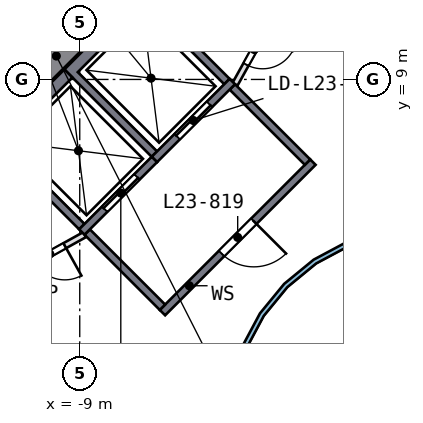
"""IFC4 building model, lengths in metres.
Left out: names, types, materials, properties, quantities, classifications, styles, units other than length and angle.
Written with IfcOpenShell. Run it as: python <this file> out.ifc"""

import sys

from ifc_helpers import new_model, si_unit, direction, frame, frame_2d, origin, place, context, subcontext, project, spatial, polyline, rectangle, outline, extrude, element, fill, save


model = new_model("IFC4")
c1 = context("Model", 3, precision=1e-05, world=origin(), true_north=direction((0.0, 1.0)))
c2 = subcontext(c1, "Body", "Model", "MODEL_VIEW")
j1 = project(units=[si_unit("LENGTHUNIT", "METRE"), si_unit("PLANEANGLEUNIT", "RADIAN")], contexts=[c1])
p1 = place(None, origin())
s1 = spatial("IfcSite", under=j1, at=p1, CompositionType="ELEMENT")
p2 = place(p1, origin())
s2 = spatial("IfcBuilding", under=s1, at=p2, CompositionType="ELEMENT")
p3 = place(p2, frame((0.0, 0.0, 100.0)))
s3 = spatial("IfcBuildingStorey", under=s2, at=p3, CompositionType="ELEMENT", Elevation=100.0)
p4 = place(p3, frame((-5.516, 13.717, 0.0), z_axis=(0.0, 0.0, 1.0), x_axis=(-0.707106781, -0.707106781, 0.0)))
e1 = element("IfcWall", 1, at=p4, inside=s3, PredefinedType="SHEAR", context=c2, shape_type="SweptSolid", body=[
    extrude(rectangle(XDim=11.598, YDim=0.8, at=frame_2d((5.799, 0.0))), origin(), (0.0, 0.0, 1.0), 3.5),
])
p5 = place(p3, origin())
e2 = element("IfcWall", 2, at=p5, inside=s3, PredefinedType="SOLIDWALL", context=c2, shape_type="SweptSolid", body=[
    extrude(outline(polyline([(-9.405, 9.263), (-7.354, 11.314), (-5.056, 9.016), (-5.197, 8.874), (-7.283, 10.96), (-9.051, 9.192), (-6.965, 7.106), (-7.106, 6.965), (-9.405, 9.263)])), origin(), (0.0, 0.0, 1.0), 3.19),
])
p6 = place(p3, frame((-4.985, 8.945, 0.0), z_axis=(0.0, 0.0, 1.0), x_axis=(-0.707106781, -0.707106781, 0.0)))
e3 = element("IfcWall", 3, at=p6, inside=s3, PredefinedType="SOLIDWALL", context=c2, shape_type="SweptSolid", body=[
    extrude(rectangle(XDim=2.9, YDim=0.2, at=frame_2d((1.45, 0.0))), origin(), (0.0, 0.0, 1.0), 3.19),
])
p7 = place(p6, frame((0.85, 0.0, 0.0)))
e4 = element("IfcOpeningElement", 4, at=p7, cuts=e3, PredefinedType="OPENING", context=c2, shape_type="SweptSolid", body=[
    extrude(rectangle(XDim=1.2, YDim=2.1, at=frame_2d((0.6, 1.05))), frame((0.0, 0.11, 0.0), z_axis=(0.0, -1.0, 0.0), x_axis=(1.0, 0.0, 0.0)), (0.0, 0.0, 1.0), 0.22),
])
p8 = place(p3, origin())
e5 = element("IfcWall", 5, at=p8, inside=s3, PredefinedType="SOLIDWALL", context=c2, shape_type="SweptSolid", body=[
    extrude(outline(polyline([(-11.314, 7.354), (-9.405, 9.263), (-9.192, 9.051), (-10.96, 7.283), (-8.874, 5.197), (-9.016, 5.056), (-11.314, 7.354)])), origin(), (0.0, 0.0, 1.0), 3.19),
])
p9 = place(p3, frame((-7.036, 6.894, 0.0), z_axis=(0.0, 0.0, 1.0), x_axis=(-0.707106781, -0.707106781, 0.0)))
e6 = element("IfcWall", 6, at=p9, inside=s3, PredefinedType="SOLIDWALL", context=c2, shape_type="SweptSolid", body=[
    extrude(rectangle(XDim=2.7, YDim=0.2, at=frame_2d((1.35, 0.0))), origin(), (0.0, 0.0, 1.0), 3.19),
])
p10 = place(p9, frame((0.65, 0.0, 0.0)))
e7 = element("IfcOpeningElement", 7, at=p10, cuts=e6, PredefinedType="OPENING", context=c2, shape_type="SweptSolid", body=[
    extrude(rectangle(XDim=1.2, YDim=2.1, at=frame_2d((0.6, 1.05))), frame((0.0, 0.11, 0.0), z_axis=(0.0, -1.0, 0.0), x_axis=(1.0, 0.0, 0.0)), (0.0, 0.0, 1.0), 0.22),
])
p11 = place(p3, frame((-2.864, 6.823, 0.0), z_axis=(0.0, 0.0, 1.0), x_axis=(-0.707106781, -0.707106781, 0.0)))
e8 = element("IfcWall", 8, at=p11, inside=s3, PredefinedType="SOLIDWALL", context=c2, shape_type="SweptSolid", body=[
    extrude(rectangle(XDim=5.6, YDim=0.2, at=frame_2d((2.8, 0.0))), origin(), (0.0, 0.0, 1.0), 3.19),
])
p12 = place(p11, frame((2.2, 0.0, 0.0)))
e9 = element("IfcOpeningElement", 9, at=p12, cuts=e8, PredefinedType="OPENING", context=c2, shape_type="SweptSolid", body=[
    extrude(rectangle(XDim=1.2, YDim=2.1, at=frame_2d((0.6, 1.05))), frame((0.0, 0.11, 0.0), z_axis=(0.0, -1.0, 0.0), x_axis=(1.0, 0.0, 0.0)), (0.0, 0.0, 1.0), 0.22),
])
for number, where, z_axis, x_axis in (
    (10, (-3.005, 6.823, 0.0), (0.0, 0.0, 1.0), (-0.707, 0.707, 0.0)),
    (11, (-6.823, 3.005, 0.0), (0.0, 0.0, 1.0), (-0.707, 0.707, 0.0)),
):
    element("IfcWall", number, at=place(p3, frame(where, z_axis=z_axis, x_axis=x_axis)), inside=s3, PredefinedType="SOLIDWALL", context=c2, shape_type="SweptSolid", body=[
        extrude(rectangle(XDim=2.8, YDim=0.2, at=frame_2d((1.4, 0.0))), origin(), (0.0, 0.0, 1.0), 3.19),
    ])
p13 = place(p3, frame((-3.9, 10.7, 0.0), z_axis=(0.0, 0.0, 1.0), x_axis=(-0.485692555, -0.874129705, 0.0)))
e12 = element("IfcWall", 12, at=p13, inside=s3, PredefinedType="PARTITIONING", context=c2, shape_type="SweptSolid", body=[
    extrude(rectangle(XDim=2.089, YDim=0.15, at=frame_2d((1.044, 0.0))), origin(), (0.0, 0.0, 1.0), 3.19),
])
p14 = place(p13, frame((0.594, 0.0, 0.0)))
e13 = element("IfcOpeningElement", 13, at=p14, cuts=e12, PredefinedType="OPENING", context=c2, shape_type="SweptSolid", body=[
    extrude(rectangle(XDim=0.9, YDim=2.1, at=frame_2d((0.45, 1.05))), frame((0.0, 0.085, 0.0), z_axis=(0.0, -1.0, 0.0), x_axis=(1.0, 0.0, 0.0)), (0.0, 0.0, 1.0), 0.17),
])
p15 = place(p3, frame((-8.874, 4.914, 0.0), z_axis=(0.0, 0.0, 1.0), x_axis=(-0.874129705, -0.485692555, 0.0)))
e14 = element("IfcWall", 14, at=p15, inside=s3, PredefinedType="PARTITIONING", context=c2, shape_type="SweptSolid", body=[
    extrude(rectangle(XDim=2.089, YDim=0.15, at=frame_2d((1.044, 0.0))), origin(), (0.0, 0.0, 1.0), 3.19),
])
p16 = place(p15, frame((0.594, 0.0, 0.0)))
e15 = element("IfcOpeningElement", 15, at=p16, cuts=e14, PredefinedType="OPENING", context=c2, shape_type="SweptSolid", body=[
    extrude(rectangle(XDim=0.9, YDim=2.1, at=frame_2d((0.45, 1.05))), frame((0.0, 0.085, 0.0), z_axis=(0.0, -1.0, 0.0), x_axis=(1.0, 0.0, 0.0)), (0.0, 0.0, 1.0), 0.17),
])
p17 = place(p3, origin())
e16 = element("IfcWall", 16, at=p17, inside=s3, PredefinedType="SOLIDWALL", context=c2, shape_type="SweptSolid", body=[
    extrude(outline(polyline([(5.021, -0.999), (4.73, -1.959), (4.257, -2.844), (3.62, -3.62), (2.844, -4.257), (1.959, -4.73), (0.999, -5.021), (0.0, -5.12), (-0.999, -5.021), (-1.959, -4.73), (-2.844, -4.257), (-3.62, -3.62), (-4.257, -2.844), (-4.73, -1.959), (-5.021, -0.999), (-5.12, 0.0), (-5.021, 0.999), (-4.73, 1.959), (-4.257, 2.844), (-3.62, 3.62), (-2.844, 4.257), (-1.959, 4.73), (-0.999, 5.021), (0.0, 5.12), (0.999, 5.021), (1.959, 4.73), (2.844, 4.257), (3.62, 3.62), (4.257, 2.844), (4.73, 1.959), (5.021, 0.999), (5.12, 0.0), (5.021, -0.999)]), holes=[polyline([(4.904, 0.976), (4.619, 1.913), (4.157, 2.778), (3.535, 3.535), (2.778, 4.157), (1.913, 4.619), (0.976, 4.904), (0.0, 5.0), (-0.976, 4.904), (-1.913, 4.619), (-2.778, 4.157), (-3.535, 3.535), (-4.157, 2.778), (-4.619, 1.913), (-4.904, 0.976), (-5.0, 0.0), (-4.904, -0.976), (-4.619, -1.913), (-4.157, -2.778), (-3.535, -3.535), (-2.778, -4.157), (-1.913, -4.619), (-0.976, -4.904), (0.0, -5.0), (0.976, -4.904), (1.913, -4.619), (2.778, -4.157), (3.535, -3.535), (4.157, -2.778), (4.619, -1.913), (4.904, -0.976), (5.0, 0.0), (4.904, 0.976)])]), origin(), (0.0, 0.0, 1.0), 3.19),
])
p18 = place(p3, frame((-16.129, 8.823, 0.0), z_axis=(0.0, 0.0, 1.0), x_axis=(0.69063279, 0.723205606, 0.0)))
e17 = element("IfcWall", 17, at=p18, inside=s3, PredefinedType="SOLIDWALL", context=c2, shape_type="SweptSolid", body=[
    extrude(rectangle(XDim=9.317, YDim=0.2, at=frame_2d((4.658, 0.0))), origin(), (0.0, 0.0, 1.0), 3.19),
])
p19 = place(p18, frame((1.9, 0.0, 0.0)))
e18 = element("IfcOpeningElement", 18, at=p19, cuts=e17, PredefinedType="OPENING", context=c2, shape_type="SweptSolid", body=[
    extrude(rectangle(XDim=1.0, YDim=2.1, at=frame_2d((0.5, 1.05))), frame((0.0, 0.11, 0.0), z_axis=(0.0, -1.0, 0.0), x_axis=(1.0, 0.0, 0.0)), (0.0, 0.0, 1.0), 0.22),
])
p20 = place(p7, origin())
e19 = element("IfcDoor", 19, at=p20, inside=s3, OperationType="DOUBLE_DOOR_SLIDING", PredefinedType="DOOR", context=c2, shape_type="SweptSolid", body=[
    extrude(rectangle(XDim=1.2, YDim=2.1, at=frame_2d((0.6, 1.05))), frame((0.0, 0.025, 0.0), z_axis=(0.0, -1.0, 0.0), x_axis=(1.0, 0.0, 0.0)), (0.0, 0.0, 1.0), 0.05),
])
fill(e4, e19)
p21 = place(p10, origin())
e20 = element("IfcDoor", 20, at=p21, inside=s3, OperationType="DOUBLE_DOOR_SLIDING", PredefinedType="DOOR", context=c2, shape_type="SweptSolid", body=[
    extrude(rectangle(XDim=1.2, YDim=2.1, at=frame_2d((0.6, 1.05))), frame((0.0, 0.025, 0.0), z_axis=(0.0, -1.0, 0.0), x_axis=(1.0, 0.0, 0.0)), (0.0, 0.0, 1.0), 0.05),
])
fill(e7, e20)
p22 = place(p12, origin())
e21 = element("IfcDoor", 21, at=p22, inside=s3, OperationType="SINGLE_SWING_LEFT", PredefinedType="DOOR", context=c2, shape_type="SweptSolid", body=[
    extrude(rectangle(XDim=1.2, YDim=2.1, at=frame_2d((0.6, 1.05))), frame((0.0, 0.025, 0.0), z_axis=(0.0, -1.0, 0.0), x_axis=(1.0, 0.0, 0.0)), (0.0, 0.0, 1.0), 0.05),
])
fill(e9, e21)
p23 = place(p14, origin())
e22 = element("IfcDoor", 22, at=p23, inside=s3, OperationType="SINGLE_SWING_LEFT", PredefinedType="DOOR", context=c2, shape_type="SweptSolid", body=[
    extrude(rectangle(XDim=0.9, YDim=2.1, at=frame_2d((0.45, 1.05))), frame((0.0, 0.025, 0.0), z_axis=(0.0, -1.0, 0.0), x_axis=(1.0, 0.0, 0.0)), (0.0, 0.0, 1.0), 0.05),
])
fill(e13, e22)
p24 = place(p16, origin())
e23 = element("IfcDoor", 23, at=p24, inside=s3, OperationType="SINGLE_SWING_LEFT", PredefinedType="DOOR", context=c2, shape_type="SweptSolid", body=[
    extrude(rectangle(XDim=0.9, YDim=2.1, at=frame_2d((0.45, 1.05))), frame((0.0, 0.025, 0.0), z_axis=(0.0, -1.0, 0.0), x_axis=(1.0, 0.0, 0.0)), (0.0, 0.0, 1.0), 0.05),
])
fill(e15, e23)
save(model, sys.argv[1])
